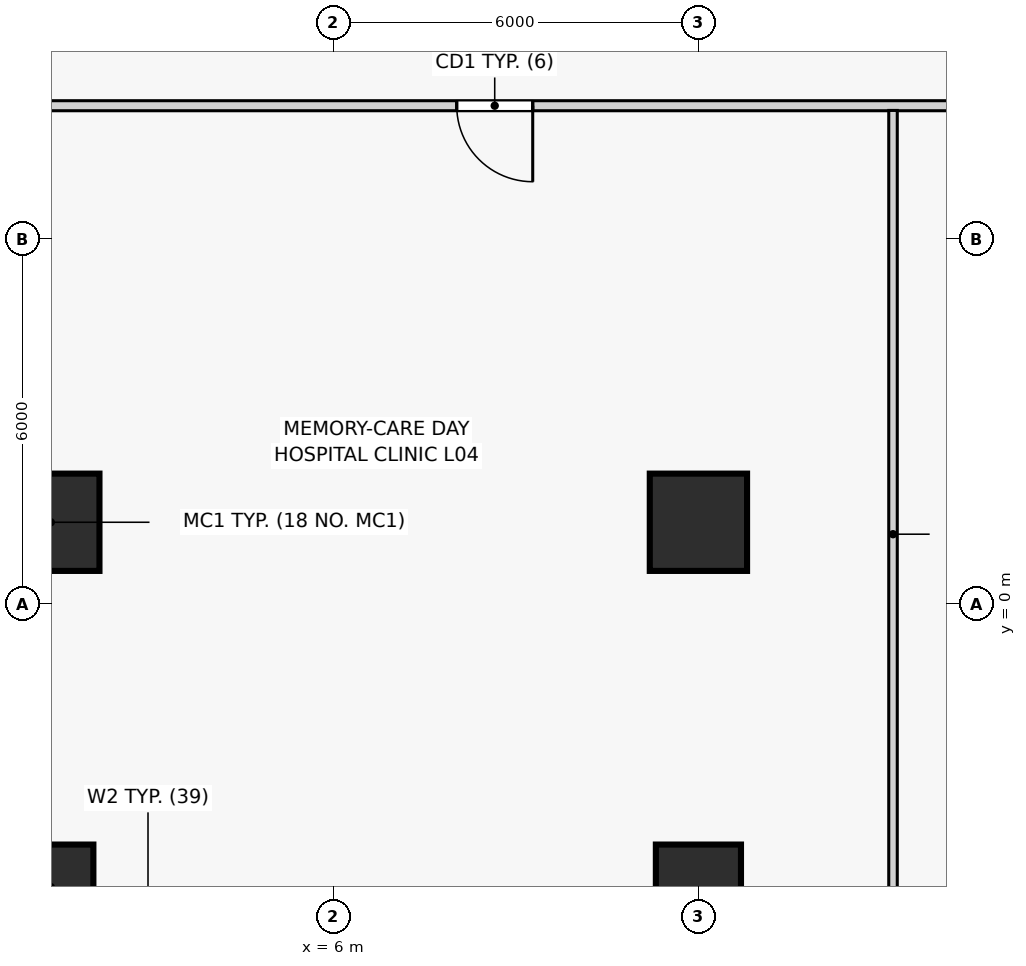
"""IFC4 building model, lengths in metres.
Left out: names, types, materials, properties, quantities, classifications, styles, units other than length and angle.
Written with IfcOpenShell. Run it as: python <this file> out.ifc"""

import sys

from ifc_helpers import new_model, si_unit, direction, frame, frame_2d, origin, origin_2d, place, context, subcontext, project, spatial, rectangle, extrude, source, transform, mapped, element, fill, save


model = new_model("IFC4")
c1 = context("Model", 3, precision=1e-05, world=origin(), true_north=direction((0.0, 1.0)))
c2 = subcontext(c1, "Body", "Model", "MODEL_VIEW")
j1 = project(units=[si_unit("LENGTHUNIT", "METRE"), si_unit("PLANEANGLEUNIT", "RADIAN")], contexts=[c1])
p1 = place(None, origin())
s1 = spatial("IfcSite", under=j1, at=p1, CompositionType="ELEMENT")
p2 = place(p1, origin())
s2 = spatial("IfcBuilding", under=s1, at=p2, CompositionType="ELEMENT")
p3 = place(p2, frame((0.0, 0.0, 18.0)))
s3 = spatial("IfcBuildingStorey", under=s2, at=p3, CompositionType="ELEMENT", Elevation=18.0)
m1 = source(origin(), c2, "Body", "SweptSolid", [
    extrude(rectangle(XDim=1.4, YDim=1.4, at=origin_2d()), origin(), (0.0, 0.0, 1.0), 4.5),
])
p4 = place(p3, frame((1.35, -4.65, 0.0), z_axis=(0.0, 0.0, 1.0), x_axis=(1.0, 0.0, 0.0)))
e1 = element("IfcColumn", 1, at=p4, inside=s3, PredefinedType="COLUMN", context=c2, shape_type="MappedRepresentation", body=[
    mapped(m1, transform((0.0, 0.0, 0.0), scale=1.0)),
])
m2 = source(origin(), c2, "Body", "SweptSolid", [
    extrude(rectangle(XDim=1.6, YDim=1.6, at=origin_2d()), origin(), (0.0, 0.0, 1.0), 4.5),
])
p5 = place(p3, frame((1.35, 1.35, 0.0), z_axis=(0.0, 0.0, 1.0), x_axis=(1.0, 0.0, 0.0)))
e2 = element("IfcColumn", 2, at=p5, inside=s3, PredefinedType="COLUMN", context=c2, shape_type="MappedRepresentation", body=[
    mapped(m2, transform((0.0, 0.0, 0.0), scale=1.0)),
])
p6 = place(p3, frame((12.0, -4.65, 0.0), z_axis=(0.0, 0.0, 1.0), x_axis=(1.0, 0.0, 0.0)))
e3 = element("IfcColumn", 3, at=p6, inside=s3, PredefinedType="COLUMN", context=c2, shape_type="MappedRepresentation", body=[
    mapped(m1, transform((0.0, 0.0, 0.0), scale=1.0)),
])
p7 = place(p3, frame((12.0, 1.35, 0.0), z_axis=(0.0, 0.0, 1.0), x_axis=(1.0, 0.0, 0.0)))
e4 = element("IfcColumn", 4, at=p7, inside=s3, PredefinedType="COLUMN", context=c2, shape_type="MappedRepresentation", body=[
    mapped(m2, transform((0.0, 0.0, 0.0), scale=1.0)),
])
p8 = place(p3, frame((0.185, 8.2, 0.0), z_axis=(0.0, 0.0, 1.0), x_axis=(1.0, 0.0, 0.0)))
e5 = element("IfcWall", 5, at=p8, inside=s3, PredefinedType="PARTITIONING", context=c2, shape_type="SweptSolid", body=[
    extrude(rectangle(XDim=25.265, YDim=0.165, at=frame_2d((12.632, 0.0))), origin(), (0.0, 0.0, 1.0), 3.85),
])
p9 = place(p8, frame((7.84, 0.0, 0.0)))
e6 = element("IfcOpeningElement", 6, at=p9, cuts=e5, PredefinedType="OPENING", context=c2, shape_type="SweptSolid", body=[
    extrude(rectangle(XDim=1.25, YDim=2.2, at=frame_2d((0.625, 1.1))), frame((0.0, 0.093, 0.0), z_axis=(0.0, -1.0, 0.0), x_axis=(1.0, 0.0, 0.0)), (0.0, 0.0, 1.0), 0.185),
])
p10 = place(p8, frame((19.565, 0.0, 0.0)))
e7 = element("IfcOpeningElement", 7, at=p10, cuts=e5, PredefinedType="OPENING", context=c2, shape_type="SweptSolid", body=[
    extrude(rectangle(XDim=1.25, YDim=2.2, at=frame_2d((0.625, 1.1))), frame((0.0, 0.093, 0.0), z_axis=(0.0, -1.0, 0.0), x_axis=(1.0, 0.0, 0.0)), (0.0, 0.0, 1.0), 0.185),
])
p11 = place(p3, frame((15.2, -5.815, 0.0), z_axis=(0.0, 0.0, 1.0), x_axis=(0.0, 1.0, 0.0)))
e8 = element("IfcWall", 8, at=p11, inside=s3, PredefinedType="PARTITIONING", context=c2, shape_type="SweptSolid", body=[
    extrude(rectangle(XDim=13.938, YDim=0.14, at=frame_2d((6.969, 0.0))), origin(), (0.0, 0.0, 1.0), 3.85),
])
m3 = source(origin(), c2, "Body", "SweptSolid", [
    extrude(rectangle(XDim=1.25, YDim=2.2, at=frame_2d((0.625, 1.1))), frame((0.0, 0.025, 0.0), z_axis=(0.0, -1.0, 0.0), x_axis=(1.0, 0.0, 0.0)), (0.0, 0.0, 1.0), 0.05),
])
p12 = place(p9, frame((1.25, 0.0, 0.0), z_axis=(0.0, 0.0, 1.0), x_axis=(-1.0, 0.0, 0.0)))
e9 = element("IfcDoor", 9, at=p12, inside=s3, OperationType="SINGLE_SWING_LEFT", PredefinedType="DOOR", context=c2, shape_type="MappedRepresentation", body=[
    mapped(m3, transform((0.0, 0.0, 0.0), scale=1.0)),
])
fill(e6, e9)
save(model, sys.argv[1])
